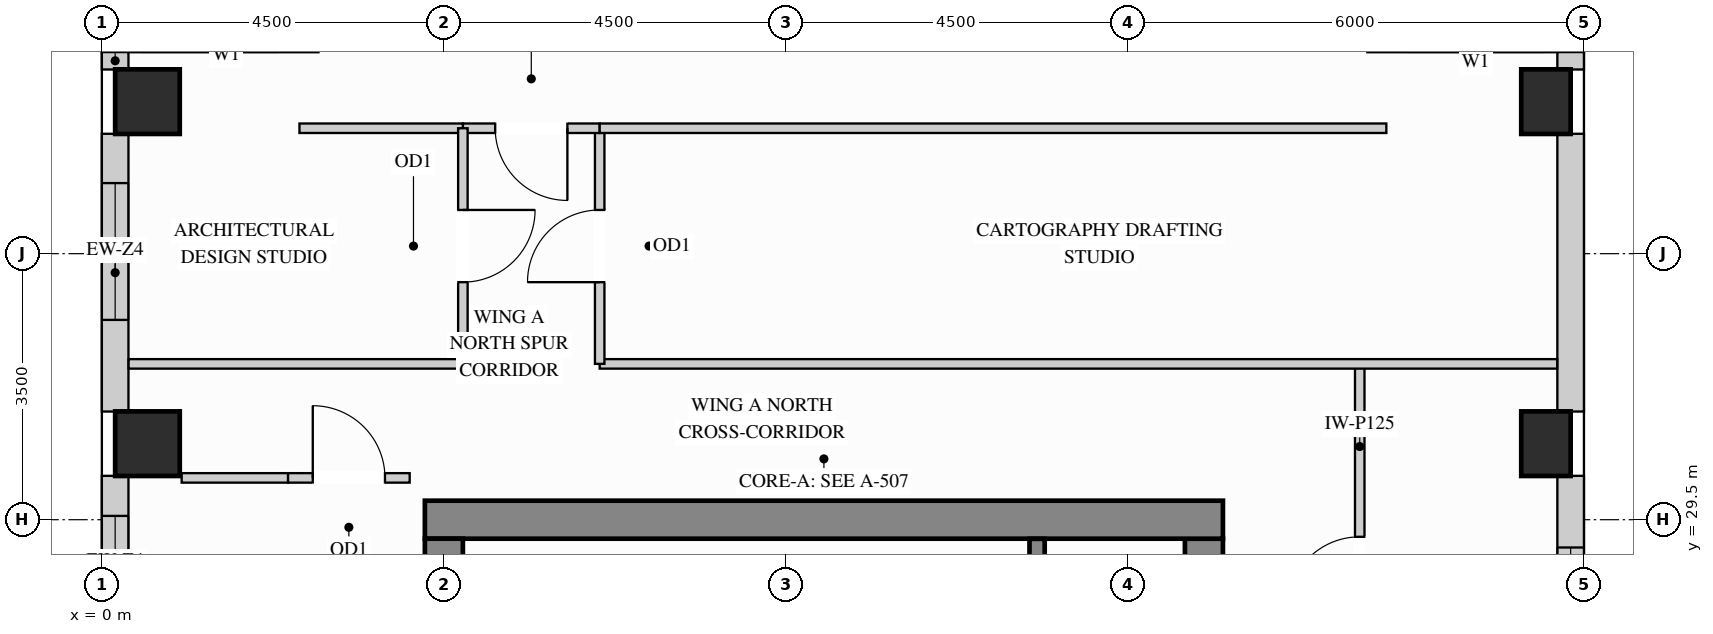
"""IFC4 building model, lengths in metres.
Left out: names, types, materials, properties, quantities, classifications, styles, units other than length and angle.
Written with IfcOpenShell. Run it as: python <this file> out.ifc"""

import sys

from ifc_helpers import new_model, si_unit, direction, frame, frame_2d, origin, origin_2d, place, context, subcontext, project, spatial, rectangle, extrude, source, transform, mapped, element, fill, save


model = new_model("IFC4")
c1 = context("Model", 3, precision=1e-05, world=origin(), true_north=direction((0.0, 1.0)))
c2 = subcontext(c1, "Body", "Model", "MODEL_VIEW")
j1 = project(units=[si_unit("LENGTHUNIT", "METRE"), si_unit("PLANEANGLEUNIT", "RADIAN")], contexts=[c1])
p1 = place(None, origin())
s1 = spatial("IfcSite", under=j1, at=p1, CompositionType="ELEMENT")
p2 = place(p1, origin())
s2 = spatial("IfcBuilding", under=s1, at=p2, CompositionType="ELEMENT")
p3 = place(p2, frame((0.0, 0.0, 219.6)))
s3 = spatial("IfcBuildingStorey", under=s2, at=p3, CompositionType="ELEMENT", Elevation=219.6)
m1 = source(origin(), c2, "Body", "SweptSolid", [
    extrude(rectangle(XDim=0.65, YDim=0.85, at=origin_2d()), origin(), (0.0, 0.0, 1.0), 3.4),
])
for number, where, z_axis, x_axis in (
    (1, (19.0, 30.5, 0.0), (0.0, 0.0, 1.0), (1.0, 0.0, 0.0)),
    (2, (19.0, 35.0, 0.0), (0.0, 0.0, 1.0), (1.0, 0.0, 0.0)),
):
    element("IfcColumn", number, at=place(p3, frame(where, z_axis=z_axis, x_axis=x_axis)), inside=s3, PredefinedType="COLUMN", context=c2, shape_type="MappedRepresentation", body=[
        mapped(m1, transform((0.0, 0.0, 0.0), x_axis=(1.0, 0.0, 0.0), y_axis=(0.0, 1.0, 0.0), z_axis=(0.0, 0.0, 1.0))),
    ])
m2 = source(origin(), c2, "Body", "SweptSolid", [
    extrude(rectangle(XDim=0.85, YDim=0.85, at=origin_2d()), origin(), (0.0, 0.0, 1.0), 3.4),
])
for number, where, z_axis, x_axis in (
    (3, (0.6, 30.5, 0.0), (0.0, 0.0, 1.0), (1.0, 0.0, 0.0)),
    (4, (0.6, 35.0, 0.0), (0.0, 0.0, 1.0), (1.0, 0.0, 0.0)),
):
    element("IfcColumn", number, at=place(p3, frame(where, z_axis=z_axis, x_axis=x_axis)), inside=s3, PredefinedType="COLUMN", context=c2, shape_type="MappedRepresentation", body=[
        mapped(m2, transform((0.0, 0.0, 0.0), x_axis=(1.0, 0.0, 0.0), y_axis=(0.0, 1.0, 0.0), z_axis=(0.0, 0.0, 1.0))),
    ])
m3 = source(origin(), c2, "Body", "SweptSolid", [
    extrude(rectangle(XDim=8.37, YDim=0.5, at=frame_2d((4.185, 0.0))), origin(), (0.0, 0.0, 1.0), 3.4),
])
p4 = place(p3, frame((14.5, 20.88, 0.0), z_axis=(0.0, 0.0, 1.0), x_axis=(0.0, 1.0, 0.0)))
e5 = element("IfcWall", 5, at=p4, inside=s3, PredefinedType="SHEAR", context=c2, shape_type="MappedRepresentation", body=[
    mapped(m3, transform((0.0, 0.0, 0.0), x_axis=(1.0, 0.0, 0.0), y_axis=(0.0, 1.0, 0.0), z_axis=(0.0, 0.0, 1.0))),
])
m4 = source(origin(), c2, "Body", "SweptSolid", [
    extrude(rectangle(XDim=10.5, YDim=0.5, at=frame_2d((5.25, 0.0))), origin(), (0.0, 0.0, 1.0), 3.4),
])
p5 = place(p3, frame((4.25, 29.5, 0.0), z_axis=(0.0, 0.0, 1.0), x_axis=(1.0, 0.0, 0.0)))
e6 = element("IfcWall", 6, at=p5, inside=s3, PredefinedType="SHEAR", context=c2, shape_type="MappedRepresentation", body=[
    mapped(m4, transform((0.0, 0.0, 0.0), x_axis=(1.0, 0.0, 0.0), y_axis=(0.0, 1.0, 0.0), z_axis=(0.0, 0.0, 1.0))),
])
m5 = source(origin(), c2, "Body", "SweptSolid", [
    extrude(rectangle(XDim=20.5, YDim=0.5, at=frame_2d((10.25, 0.0))), origin(), (0.0, 0.0, 1.0), 3.4),
])
p6 = place(p3, frame((4.5, 8.75, 0.0), z_axis=(0.0, 0.0, 1.0), x_axis=(0.0, 1.0, 0.0)))
e7 = element("IfcWall", 7, at=p6, inside=s3, PredefinedType="SHEAR", context=c2, shape_type="MappedRepresentation", body=[
    mapped(m5, transform((0.0, 0.0, 0.0), x_axis=(1.0, 0.0, 0.0), y_axis=(0.0, 1.0, 0.0), z_axis=(0.0, 0.0, 1.0))),
])
m6 = source(origin(), c2, "Body", "SweptSolid", [
    extrude(rectangle(XDim=0.229, YDim=0.35, at=frame_2d((0.115, 0.0))), origin(), (0.0, 0.0, 1.0), 3.385),
])
p7 = place(p3, frame((0.175, 35.652, 0.0), z_axis=(0.0, 0.0, 1.0), x_axis=(0.0, -1.0, 0.0)))
e8 = element("IfcWall", 8, at=p7, inside=s3, PredefinedType="SOLIDWALL", context=c2, shape_type="MappedRepresentation", body=[
    mapped(m6, transform((0.0, 0.0, 0.0), x_axis=(1.0, 0.0, 0.0), y_axis=(0.0, 1.0, 0.0), z_axis=(0.0, 0.0, 1.0))),
])
p8 = place(p3, frame((0.175, 34.577, 0.0), z_axis=(0.0, 0.0, 1.0), x_axis=(0.0, -1.0, 0.0)))
e9 = element("IfcWall", 9, at=p8, inside=s3, PredefinedType="SOLIDWALL", context=c2, shape_type="SweptSolid", body=[
    extrude(rectangle(XDim=3.654, YDim=0.35, at=frame_2d((1.827, 0.0))), origin(), (0.0, 0.0, 1.0), 3.385),
])
p9 = place(p8, frame((0.648, 0.0, 0.78)))
e10 = element("IfcOpeningElement", 10, at=p9, cuts=e9, PredefinedType="OPENING", context=c2, shape_type="SweptSolid", body=[
    extrude(rectangle(XDim=1.8, YDim=2.1, at=frame_2d((0.9, 1.05))), frame((0.0, 0.185, 0.0), z_axis=(0.0, -1.0, 0.0), x_axis=(1.0, 0.0, 0.0)), (0.0, 0.0, 1.0), 0.37),
])
p10 = place(p3, frame((0.175, 30.077, 0.0), z_axis=(0.0, 0.0, 1.0), x_axis=(0.0, -1.0, 0.0)))
e11 = element("IfcWall", 11, at=p10, inside=s3, PredefinedType="SOLIDWALL", context=c2, shape_type="SweptSolid", body=[
    extrude(rectangle(XDim=2.854, YDim=0.35, at=frame_2d((1.427, 0.0))), origin(), (0.0, 0.0, 1.0), 3.385),
])
p11 = place(p10, frame((0.527, 0.0, 0.78)))
e12 = element("IfcOpeningElement", 12, at=p11, cuts=e11, PredefinedType="OPENING", context=c2, shape_type="SweptSolid", body=[
    extrude(rectangle(XDim=1.8, YDim=2.1, at=frame_2d((0.9, 1.05))), frame((0.0, 0.185, 0.0), z_axis=(0.0, -1.0, 0.0), x_axis=(1.0, 0.0, 0.0)), (0.0, 0.0, 1.0), 0.37),
])
p12 = place(p3, frame((19.325, 27.223, 0.0), z_axis=(0.0, 0.0, 1.0), x_axis=(0.0, 1.0, 0.0)))
e13 = element("IfcWall", 13, at=p12, inside=s3, PredefinedType="SOLIDWALL", context=c2, shape_type="SweptSolid", body=[
    extrude(rectangle(XDim=2.854, YDim=0.35, at=frame_2d((1.427, 0.0))), origin(), (0.0, 0.0, 1.0), 2.619),
])
p13 = place(p12, frame((0.411, 0.0, 0.78)))
e14 = element("IfcOpeningElement", 14, at=p13, cuts=e13, PredefinedType="OPENING", context=c2, shape_type="SweptSolid", body=[
    extrude(rectangle(XDim=1.5, YDim=1.659, at=frame_2d((0.75, 0.83))), frame((0.0, 0.185, 0.0), z_axis=(0.0, -1.0, 0.0), x_axis=(1.0, 0.0, 0.0)), (0.0, 0.0, 1.0), 0.37),
])
m7 = source(origin(), c2, "Body", "SweptSolid", [
    extrude(rectangle(XDim=3.654, YDim=0.35, at=frame_2d((1.827, 0.0))), origin(), (0.0, 0.0, 1.0), 2.619),
])
p14 = place(p3, frame((19.325, 30.923, 0.0), z_axis=(0.0, 0.0, 1.0), x_axis=(0.0, 1.0, 0.0)))
e15 = element("IfcWall", 15, at=p14, inside=s3, PredefinedType="SOLIDWALL", context=c2, shape_type="MappedRepresentation", body=[
    mapped(m7, transform((0.0, 0.0, 0.0), x_axis=(1.0, 0.0, 0.0), y_axis=(0.0, 1.0, 0.0), z_axis=(0.0, 0.0, 1.0))),
])
p15 = place(p3, frame((19.325, 35.423, 0.0), z_axis=(0.0, 0.0, 1.0), x_axis=(0.0, 1.0, 0.0)))
e16 = element("IfcWall", 16, at=p15, inside=s3, PredefinedType="SOLIDWALL", context=c2, shape_type="MappedRepresentation", body=[
    mapped(m6, transform((0.0, 0.0, 0.0), x_axis=(1.0, 0.0, 0.0), y_axis=(0.0, 1.0, 0.0), z_axis=(0.0, 0.0, 1.0))),
])
p16 = place(p3, frame((16.55, 26.05, 0.0), z_axis=(0.0, 0.0, 1.0), x_axis=(0.0, 1.0, 0.0)))
e17 = element("IfcWall", 17, at=p16, inside=s3, PredefinedType="PARTITIONING", context=c2, shape_type="SweptSolid", body=[
    extrude(rectangle(XDim=5.5, YDim=0.125, at=frame_2d((2.75, 0.0))), origin(), (0.0, 0.0, 1.0), 3.385),
])
p17 = place(p16, frame((2.275, 0.0, 0.0)))
e18 = element("IfcOpeningElement", 18, at=p17, cuts=e17, PredefinedType="OPENING", context=c2, shape_type="SweptSolid", body=[
    extrude(rectangle(XDim=0.95, YDim=2.15, at=frame_2d((0.475, 1.075))), frame((0.0, 0.073, 0.0), z_axis=(0.0, -1.0, 0.0), x_axis=(1.0, 0.0, 0.0)), (0.0, 0.0, 1.0), 0.145),
])
m8 = source(origin(), c2, "Body", "SweptSolid", [
    extrude(rectangle(XDim=12.598, YDim=0.125, at=frame_2d((6.299, 0.0))), origin(), (0.0, 0.0, 1.0), 3.385),
])
p18 = place(p3, frame((6.55, 31.55, 0.0), z_axis=(0.0, 0.0, 1.0), x_axis=(1.0, 0.0, 0.0)))
e19 = element("IfcWall", 19, at=p18, inside=s3, PredefinedType="PARTITIONING", context=c2, shape_type="MappedRepresentation", body=[
    mapped(m8, transform((0.0, 0.0, 0.0), x_axis=(1.0, 0.0, 0.0), y_axis=(0.0, 1.0, 0.0), z_axis=(0.0, 0.0, 1.0))),
])
m9 = source(origin(), c2, "Body", "SweptSolid", [
    extrude(rectangle(XDim=4.398, YDim=0.125, at=frame_2d((2.199, 0.0))), origin(), (0.0, 0.0, 1.0), 3.385),
])
p19 = place(p3, frame((0.352, 31.55, 0.0), z_axis=(0.0, 0.0, 1.0), x_axis=(1.0, 0.0, 0.0)))
e20 = element("IfcWall", 20, at=p19, inside=s3, PredefinedType="PARTITIONING", context=c2, shape_type="MappedRepresentation", body=[
    mapped(m9, transform((0.0, 0.0, 0.0), x_axis=(1.0, 0.0, 0.0), y_axis=(0.0, 1.0, 0.0), z_axis=(0.0, 0.0, 1.0))),
])
m10 = source(origin(), c2, "Body", "SweptSolid", [
    extrude(rectangle(XDim=1.4, YDim=0.125, at=frame_2d((0.7, 0.0))), origin(), (0.0, 0.0, 1.0), 3.385),
])
p20 = place(p3, frame((1.05, 30.05, 0.0), z_axis=(0.0, 0.0, 1.0), x_axis=(1.0, 0.0, 0.0)))
e21 = element("IfcWall", 21, at=p20, inside=s3, PredefinedType="PARTITIONING", context=c2, shape_type="MappedRepresentation", body=[
    mapped(m10, transform((0.0, 0.0, 0.0), x_axis=(1.0, 0.0, 0.0), y_axis=(0.0, 1.0, 0.0), z_axis=(0.0, 0.0, 1.0))),
])
p21 = place(p3, frame((2.45, 30.05, 0.0), z_axis=(0.0, 0.0, 1.0), x_axis=(1.0, 0.0, 0.0)))
e22 = element("IfcWall", 22, at=p21, inside=s3, PredefinedType="PARTITIONING", context=c2, shape_type="SweptSolid", body=[
    extrude(rectangle(XDim=1.6, YDim=0.125, at=frame_2d((0.8, 0.0))), origin(), (0.0, 0.0, 1.0), 3.385),
])
p22 = place(p21, frame((0.325, 0.0, 0.0)))
e23 = element("IfcOpeningElement", 23, at=p22, cuts=e22, PredefinedType="OPENING", context=c2, shape_type="SweptSolid", body=[
    extrude(rectangle(XDim=0.95, YDim=2.15, at=frame_2d((0.475, 1.075))), frame((0.0, 0.073, 0.0), z_axis=(0.0, -1.0, 0.0), x_axis=(1.0, 0.0, 0.0)), (0.0, 0.0, 1.0), 0.145),
])
p23 = place(p3, frame((6.55, 31.55, 0.0), z_axis=(0.0, 0.0, 1.0), x_axis=(0.0, 1.0, 0.0)))
e24 = element("IfcWall", 24, at=p23, inside=s3, PredefinedType="PARTITIONING", context=c2, shape_type="SweptSolid", body=[
    extrude(rectangle(XDim=3.1, YDim=0.125, at=frame_2d((1.55, 0.0))), origin(), (0.0, 0.0, 1.0), 3.385),
])
p24 = place(p23, frame((1.075, 0.0, 0.0)))
e25 = element("IfcOpeningElement", 25, at=p24, cuts=e24, PredefinedType="OPENING", context=c2, shape_type="SweptSolid", body=[
    extrude(rectangle(XDim=0.95, YDim=2.15, at=frame_2d((0.475, 1.075))), frame((0.0, 0.073, 0.0), z_axis=(0.0, -1.0, 0.0), x_axis=(1.0, 0.0, 0.0)), (0.0, 0.0, 1.0), 0.145),
])
p25 = place(p3, frame((4.75, 34.65, 0.0), z_axis=(0.0, 0.0, 1.0), x_axis=(1.0, 0.0, 0.0)))
e26 = element("IfcWall", 26, at=p25, inside=s3, PredefinedType="PARTITIONING", context=c2, shape_type="SweptSolid", body=[
    extrude(rectangle(XDim=1.8, YDim=0.125, at=frame_2d((0.9, 0.0))), origin(), (0.0, 0.0, 1.0), 2.448),
])
p26 = place(p25, frame((0.425, 0.0, 0.0)))
e27 = element("IfcOpeningElement", 27, at=p26, cuts=e26, PredefinedType="OPENING", context=c2, shape_type="SweptSolid", body=[
    extrude(rectangle(XDim=0.95, YDim=2.15, at=frame_2d((0.475, 1.075))), frame((0.0, 0.073, 0.0), z_axis=(0.0, -1.0, 0.0), x_axis=(1.0, 0.0, 0.0)), (0.0, 0.0, 1.0), 0.145),
])
m11 = source(origin(), c2, "Body", "SweptSolid", [
    extrude(rectangle(XDim=10.35, YDim=0.125, at=frame_2d((5.175, 0.0))), origin(), (0.0, 0.0, 1.0), 2.448),
])
p27 = place(p3, frame((6.55, 34.65, 0.0), z_axis=(0.0, 0.0, 1.0), x_axis=(1.0, 0.0, 0.0)))
e28 = element("IfcWall", 28, at=p27, inside=s3, PredefinedType="PARTITIONING", context=c2, shape_type="MappedRepresentation", body=[
    mapped(m11, transform((0.0, 0.0, 0.0), x_axis=(1.0, 0.0, 0.0), y_axis=(0.0, 1.0, 0.0), z_axis=(0.0, 0.0, 1.0))),
])
m12 = source(origin(), c2, "Body", "SweptSolid", [
    extrude(rectangle(XDim=2.15, YDim=0.125, at=frame_2d((1.075, 0.0))), origin(), (0.0, 0.0, 1.0), 2.448),
])
p28 = place(p3, frame((2.6, 34.65, 0.0), z_axis=(0.0, 0.0, 1.0), x_axis=(1.0, 0.0, 0.0)))
e29 = element("IfcWall", 29, at=p28, inside=s3, PredefinedType="PARTITIONING", context=c2, shape_type="MappedRepresentation", body=[
    mapped(m12, transform((0.0, 0.0, 0.0), x_axis=(1.0, 0.0, 0.0), y_axis=(0.0, 1.0, 0.0), z_axis=(0.0, 0.0, 1.0))),
])
p29 = place(p3, frame((4.75, 31.55, 0.0), z_axis=(0.0, 0.0, 1.0), x_axis=(0.0, 1.0, 0.0)))
e30 = element("IfcWall", 30, at=p29, inside=s3, PredefinedType="PARTITIONING", context=c2, shape_type="SweptSolid", body=[
    extrude(rectangle(XDim=3.1, YDim=0.125, at=frame_2d((1.55, 0.0))), origin(), (0.0, 0.0, 1.0), 3.385),
])
p30 = place(p29, frame((1.075, 0.0, 0.0)))
e31 = element("IfcOpeningElement", 31, at=p30, cuts=e30, PredefinedType="OPENING", context=c2, shape_type="SweptSolid", body=[
    extrude(rectangle(XDim=0.95, YDim=2.15, at=frame_2d((0.475, 1.075))), frame((0.0, 0.073, 0.0), z_axis=(0.0, -1.0, 0.0), x_axis=(1.0, 0.0, 0.0)), (0.0, 0.0, 1.0), 0.145),
])
m13 = source(origin(), c2, "Body", "SweptSolid", [
    extrude(rectangle(XDim=3.803, YDim=0.2, at=frame_2d((1.901, 0.0))), origin(), (0.0, 0.0, 1.0), 3.4),
])
p31 = place(p3, frame((12.305, 25.445, 0.0), z_axis=(0.0, 0.0, 1.0), x_axis=(0.0, 1.0, 0.0)))
e32 = element("IfcWall", 32, at=p31, inside=s3, PredefinedType="SHEAR", context=c2, shape_type="MappedRepresentation", body=[
    mapped(m13, transform((0.0, 0.0, 0.0), x_axis=(1.0, 0.0, 0.0), y_axis=(0.0, 1.0, 0.0), z_axis=(0.0, 0.0, 1.0))),
])
m14 = source(origin(), c2, "Body", "SweptSolid", [
    extrude(rectangle(XDim=0.95, YDim=2.15, at=frame_2d((0.475, 1.075))), frame((0.0, 0.025, 0.0), z_axis=(0.0, -1.0, 0.0), x_axis=(1.0, 0.0, 0.0)), (0.0, 0.0, 1.0), 0.05),
])
p32 = place(p17, origin())
e33 = element("IfcDoor", 33, at=p32, inside=s3, OperationType="SINGLE_SWING_LEFT", PredefinedType="DOOR", context=c2, shape_type="MappedRepresentation", body=[
    mapped(m14, transform((0.0, 0.0, 0.0), x_axis=(1.0, 0.0, 0.0), y_axis=(0.0, 1.0, 0.0), z_axis=(0.0, 0.0, 1.0))),
])
fill(e18, e33)
p33 = place(p24, origin())
e34 = element("IfcDoor", 34, at=p33, inside=s3, OperationType="SINGLE_SWING_LEFT", PredefinedType="DOOR", context=c2, shape_type="MappedRepresentation", body=[
    mapped(m14, transform((0.0, 0.0, 0.0), x_axis=(1.0, 0.0, 0.0), y_axis=(0.0, 1.0, 0.0), z_axis=(0.0, 0.0, 1.0))),
])
fill(e25, e34)
p34 = place(p26, origin())
e35 = element("IfcDoor", 35, at=p34, inside=s3, OperationType="SINGLE_SWING_RIGHT", PredefinedType="DOOR", context=c2, shape_type="MappedRepresentation", body=[
    mapped(m14, transform((0.0, 0.0, 0.0), x_axis=(1.0, 0.0, 0.0), y_axis=(0.0, 1.0, 0.0), z_axis=(0.0, 0.0, 1.0))),
])
fill(e27, e35)
p35 = place(p30, origin())
e36 = element("IfcDoor", 36, at=p35, inside=s3, OperationType="SINGLE_SWING_RIGHT", PredefinedType="DOOR", context=c2, shape_type="MappedRepresentation", body=[
    mapped(m14, transform((0.0, 0.0, 0.0), x_axis=(1.0, 0.0, 0.0), y_axis=(0.0, 1.0, 0.0), z_axis=(0.0, 0.0, 1.0))),
])
fill(e31, e36)
p36 = place(p22, origin())
e37 = element("IfcDoor", 37, at=p36, inside=s3, OperationType="SINGLE_SWING_LEFT", PredefinedType="DOOR", context=c2, shape_type="MappedRepresentation", body=[
    mapped(m14, transform((0.0, 0.0, 0.0), x_axis=(1.0, 0.0, 0.0), y_axis=(0.0, 1.0, 0.0), z_axis=(0.0, 0.0, 1.0))),
])
fill(e23, e37)
m15 = source(origin(), c2, "Body", "SweptSolid", [
    extrude(rectangle(XDim=1.8, YDim=2.1, at=frame_2d((0.9, 1.05))), frame((0.0, 0.03, 0.0), z_axis=(0.0, -1.0, 0.0), x_axis=(1.0, 0.0, 0.0)), (0.0, 0.0, 1.0), 0.06),
])
p37 = place(p9, origin())
e38 = element("IfcWindow", 38, at=p37, inside=s3, PartitioningType="SINGLE_PANEL", PredefinedType="WINDOW", context=c2, shape_type="MappedRepresentation", body=[
    mapped(m15, transform((0.0, 0.0, 0.0), x_axis=(1.0, 0.0, 0.0), y_axis=(0.0, 1.0, 0.0), z_axis=(0.0, 0.0, 1.0))),
])
fill(e10, e38)
p38 = place(p11, origin())
e39 = element("IfcWindow", 39, at=p38, inside=s3, PartitioningType="SINGLE_PANEL", PredefinedType="WINDOW", context=c2, shape_type="MappedRepresentation", body=[
    mapped(m15, transform((0.0, 0.0, 0.0), x_axis=(1.0, 0.0, 0.0), y_axis=(0.0, 1.0, 0.0), z_axis=(0.0, 0.0, 1.0))),
])
fill(e12, e39)
m16 = source(origin(), c2, "Body", "SweptSolid", [
    extrude(rectangle(XDim=1.5, YDim=1.659, at=frame_2d((0.75, 0.83))), frame((0.0, 0.03, 0.0), z_axis=(0.0, -1.0, 0.0), x_axis=(1.0, 0.0, 0.0)), (0.0, 0.0, 1.0), 0.06),
])
p39 = place(p13, origin())
e40 = element("IfcWindow", 40, at=p39, inside=s3, PartitioningType="SINGLE_PANEL", PredefinedType="WINDOW", context=c2, shape_type="MappedRepresentation", body=[
    mapped(m16, transform((0.0, 0.0, 0.0), x_axis=(1.0, 0.0, 0.0), y_axis=(0.0, 1.0, 0.0), z_axis=(0.0, 0.0, 1.0))),
])
fill(e14, e40)
save(model, sys.argv[1])
